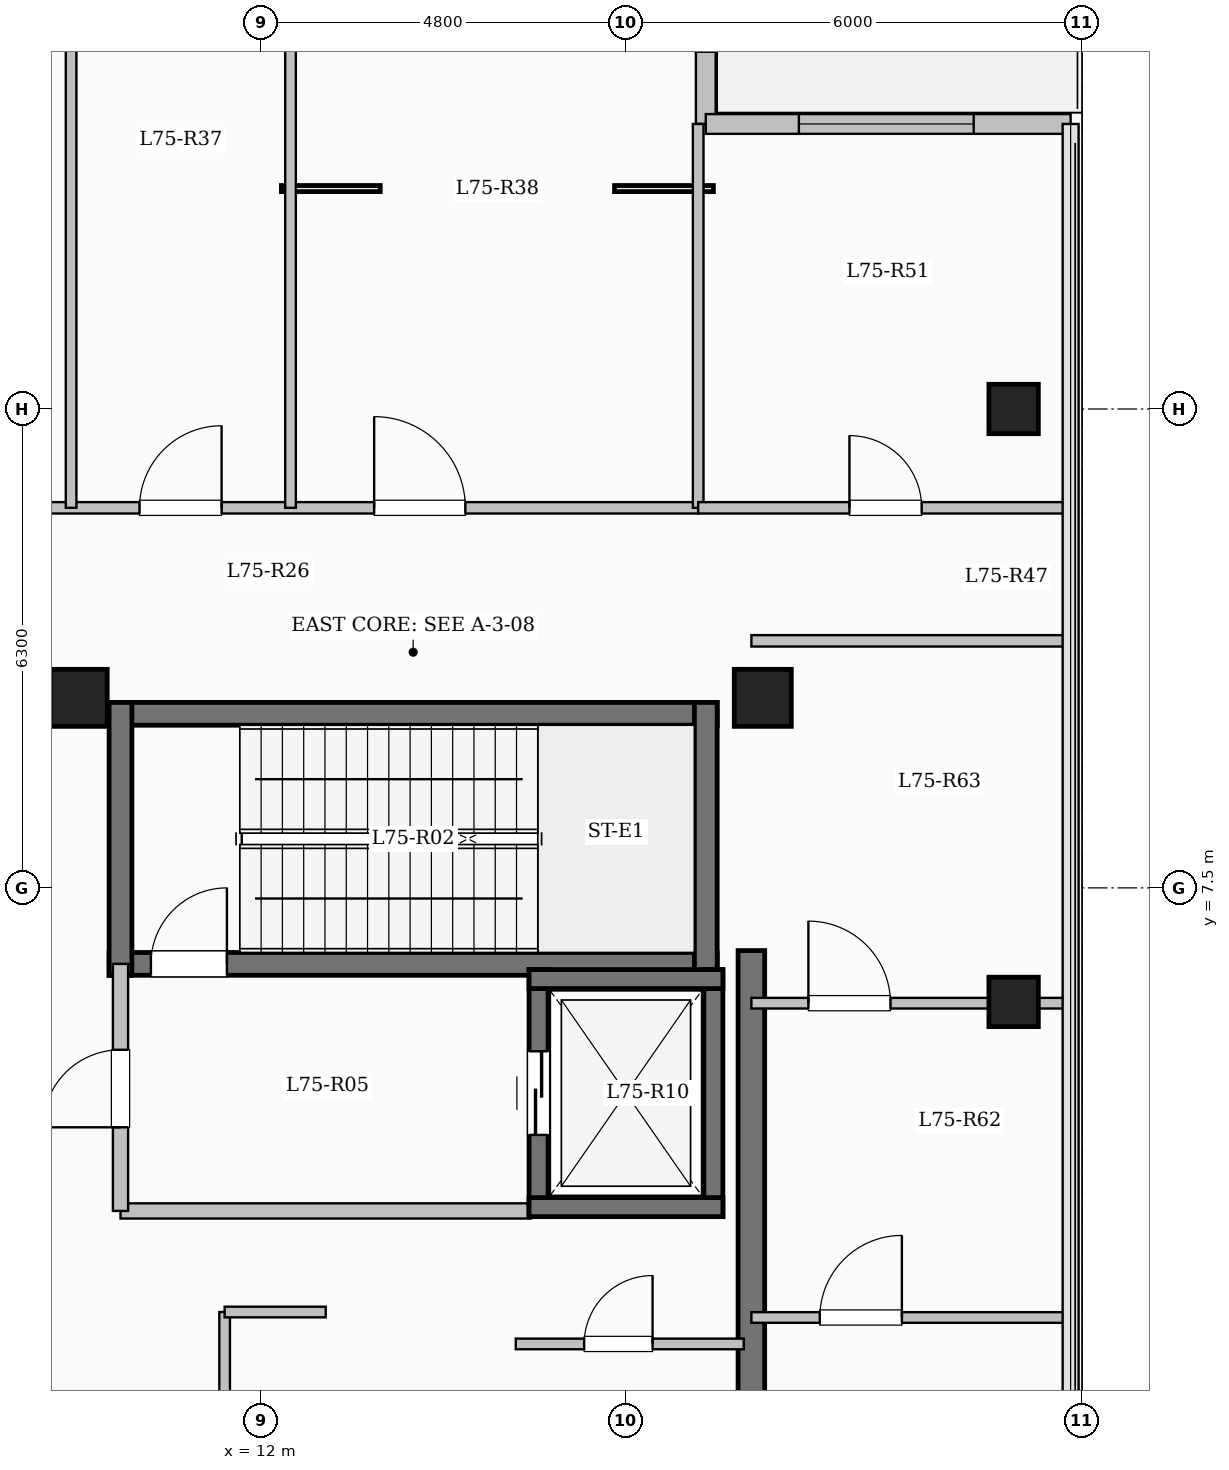
"""IFC4 building model, lengths in metres.
Left out: names, types, materials, properties, quantities, classifications, styles, units other than length and angle.
Written with IfcOpenShell. Run it as: python <this file> out.ifc"""

import sys

from ifc_helpers import new_model, si_unit, direction, frame, frame_2d, origin, origin_2d, place, context, subcontext, project, spatial, rectangle, extrude, element, fill, save


model = new_model("IFC4")
c1 = context("Model", 3, precision=1e-05, world=origin(), true_north=direction((0.0, 1.0)))
c2 = subcontext(c1, "Body", "Model", "MODEL_VIEW")
j1 = project(units=[si_unit("LENGTHUNIT", "METRE"), si_unit("PLANEANGLEUNIT", "RADIAN")], contexts=[c1])
p1 = place(None, origin())
s1 = spatial("IfcSite", under=j1, at=p1, CompositionType="ELEMENT")
p2 = place(p1, origin())
s2 = spatial("IfcBuilding", under=s1, at=p2, CompositionType="ELEMENT")
p3 = place(p2, frame((0.0, 0.0, 276.3)))
s3 = spatial("IfcBuildingStorey", under=s2, at=p3, CompositionType="ELEMENT", Elevation=276.3)
for number, where, z_axis, x_axis in (
    (1, (9.6, 10.0, 0.0), (0.0, 0.0, 1.0), (1.0, 0.0, 0.0)),
    (2, (18.6, 10.0, 0.0), (0.0, 0.0, 1.0), (1.0, 0.0, 0.0)),
):
    element("IfcColumn", number, at=place(p3, frame(where, z_axis=z_axis, x_axis=x_axis)), inside=s3, PredefinedType="COLUMN", context=c2, shape_type="SweptSolid", body=[
        extrude(rectangle(XDim=0.75, YDim=0.75, at=origin_2d()), origin(), (0.0, 0.0, 1.0), 5.25),
    ])
for number, where, z_axis, x_axis in (
    (3, (21.9, 6.0, 0.0), (0.0, 0.0, 1.0), (1.0, 0.0, 0.0)),
    (4, (21.9, 13.8, 0.0), (0.0, 0.0, 1.0), (1.0, 0.0, 0.0)),
):
    element("IfcColumn", number, at=place(p3, frame(where, z_axis=z_axis, x_axis=x_axis)), inside=s3, PredefinedType="COLUMN", context=c2, shape_type="SweptSolid", body=[
        extrude(rectangle(XDim=0.65, YDim=0.65, at=origin_2d()), origin(), (0.0, 0.0, 1.0), 5.25),
    ])
p4 = place(p3, frame((17.85, 20.85, 0.0), z_axis=(0.0, 0.0, 1.0), x_axis=(0.0, -1.0, 0.0)))
e5 = element("IfcWall", 5, at=p4, inside=s3, PredefinedType="SOLIDWALL", context=c2, shape_type="SweptSolid", body=[
    extrude(rectangle(XDim=3.3, YDim=0.26, at=frame_2d((1.65, 0.0))), origin(), (0.0, 0.0, 1.0), 4.95),
])
p5 = place(p4, frame((1.25, 0.0, 0.0)))
e6 = element("IfcOpeningElement", 6, at=p5, cuts=e5, PredefinedType="OPENING", context=c2, shape_type="SweptSolid", body=[
    extrude(rectangle(XDim=1.1, YDim=2.2, at=frame_2d((0.55, 1.1))), frame((0.0, 0.14, 0.0), z_axis=(0.0, -1.0, 0.0), x_axis=(1.0, 0.0, 0.0)), (0.0, 0.0, 1.0), 0.28),
])
p6 = place(p4, frame((0.365, 0.0, 0.95)))
e7 = element("IfcOpeningElement", 7, at=p6, cuts=e5, PredefinedType="OPENING", context=c2, shape_type="SweptSolid", body=[
    extrude(rectangle(XDim=0.7, YDim=1.5, at=frame_2d((0.35, 0.75))), frame((0.0, 0.14, 0.0), z_axis=(0.0, -1.0, 0.0), x_axis=(1.0, 0.0, 0.0)), (0.0, 0.0, 1.0), 0.28),
])
p7 = place(p3, frame((17.85, 17.55, 0.0), z_axis=(0.0, 0.0, 1.0), x_axis=(1.0, 0.0, 0.0)))
e8 = element("IfcWall", 8, at=p7, inside=s3, PredefinedType="SOLIDWALL", context=c2, shape_type="SweptSolid", body=[
    extrude(rectangle(XDim=4.8, YDim=0.26, at=frame_2d((2.4, 0.0))), origin(), (0.0, 0.0, 1.0), 4.95),
])
p8 = place(p7, frame((1.225, 0.0, 0.85)))
e9 = element("IfcOpeningElement", 9, at=p8, cuts=e8, PredefinedType="OPENING", context=c2, shape_type="SweptSolid", body=[
    extrude(rectangle(XDim=2.3, YDim=2.2, at=frame_2d((1.15, 1.1))), frame((0.0, 0.14, 0.0), z_axis=(0.0, -1.0, 0.0), x_axis=(1.0, 0.0, 0.0)), (0.0, 0.0, 1.0), 0.28),
])
p9 = place(p3, frame((10.0, 9.79, 0.0), z_axis=(0.0, 0.0, 1.0), x_axis=(1.0, 0.0, 0.0)))
e10 = element("IfcWall", 10, at=p9, inside=s3, PredefinedType="SHEAR", context=c2, shape_type="SweptSolid", body=[
    extrude(rectangle(XDim=8.0, YDim=0.3, at=frame_2d((4.0, 0.0))), origin(), (0.0, 0.0, 1.0), 5.25),
])
p10 = place(p3, frame((10.0, 6.5, 0.0), z_axis=(0.0, 0.0, 1.0), x_axis=(1.0, 0.0, 0.0)))
e11 = element("IfcWall", 11, at=p10, inside=s3, PredefinedType="SHEAR", context=c2, shape_type="SweptSolid", body=[
    extrude(rectangle(XDim=8.0, YDim=0.3, at=frame_2d((4.0, 0.0))), origin(), (0.0, 0.0, 1.0), 5.25),
])
p11 = place(p10, frame((0.55, 0.0, 0.0)))
e12 = element("IfcOpeningElement", 12, at=p11, cuts=e11, PredefinedType="OPENING", context=c2, shape_type="SweptSolid", body=[
    extrude(rectangle(XDim=1.0, YDim=2.15, at=frame_2d((0.5, 1.075))), frame((0.0, 0.16, 0.0), z_axis=(0.0, -1.0, 0.0), x_axis=(1.0, 0.0, 0.0)), (0.0, 0.0, 1.0), 0.32),
])
for number, where, z_axis, x_axis in (
    (13, (10.15, 6.35, 0.0), (0.0, 0.0, 1.0), (0.0, 1.0, 0.0)),
    (14, (17.85, 6.35, 0.0), (0.0, 0.0, 1.0), (0.0, 1.0, 0.0)),
):
    element("IfcWall", number, at=place(p3, frame(where, z_axis=z_axis, x_axis=x_axis)), inside=s3, PredefinedType="SHEAR", context=c2, shape_type="SweptSolid", body=[
        extrude(rectangle(XDim=3.59, YDim=0.3, at=frame_2d((1.795, 0.0))), origin(), (0.0, 0.0, 1.0), 5.25),
    ])
p12 = place(p3, frame((10.15, 3.25, 0.0), z_axis=(0.0, 0.0, 1.0), x_axis=(1.0, 0.0, 0.0)))
e15 = element("IfcWall", 15, at=p12, inside=s3, PredefinedType="SOLIDWALL", context=c2, shape_type="SweptSolid", body=[
    extrude(rectangle(XDim=5.4, YDim=0.2, at=frame_2d((2.7, 0.0))), origin(), (0.0, 0.0, 1.0), 4.95),
])
p13 = place(p3, frame((10.15, 3.25, 0.0), z_axis=(0.0, 0.0, 1.0), x_axis=(0.0, 1.0, 0.0)))
e16 = element("IfcWall", 16, at=p13, inside=s3, PredefinedType="SOLIDWALL", context=c2, shape_type="SweptSolid", body=[
    extrude(rectangle(XDim=3.25, YDim=0.2, at=frame_2d((1.625, 0.0))), origin(), (0.0, 0.0, 1.0), 4.95),
])
p14 = place(p13, frame((1.1, 0.0, 0.0)))
e17 = element("IfcOpeningElement", 17, at=p14, cuts=e16, PredefinedType="OPENING", context=c2, shape_type="SweptSolid", body=[
    extrude(rectangle(XDim=1.02, YDim=2.15, at=frame_2d((0.51, 1.075))), frame((0.0, 0.11, 0.0), z_axis=(0.0, -1.0, 0.0), x_axis=(1.0, 0.0, 0.0)), (0.0, 0.0, 1.0), 0.22),
])
p15 = place(p3, frame((15.65, 3.175, 0.0), z_axis=(0.0, 0.0, 1.0), x_axis=(0.0, 1.0, 0.0)))
e18 = element("IfcWall", 18, at=p15, inside=s3, PredefinedType="SHEAR", context=c2, shape_type="SweptSolid", body=[
    extrude(rectangle(XDim=3.25, YDim=0.25, at=frame_2d((1.625, 0.0))), origin(), (0.0, 0.0, 1.0), 5.25),
])
p16 = place(p15, frame((1.075, 0.0, 0.0)))
e19 = element("IfcOpeningElement", 19, at=p16, cuts=e18, PredefinedType="OPENING", context=c2, shape_type="SweptSolid", body=[
    extrude(rectangle(XDim=1.1, YDim=2.15, at=frame_2d((0.55, 1.075))), frame((0.0, 0.135, 0.0), z_axis=(0.0, -1.0, 0.0), x_axis=(1.0, 0.0, 0.0)), (0.0, 0.0, 1.0), 0.27),
])
p17 = place(p3, frame((17.95, 3.175, 0.0), z_axis=(0.0, 0.0, 1.0), x_axis=(0.0, 1.0, 0.0)))
e20 = element("IfcWall", 20, at=p17, inside=s3, PredefinedType="SHEAR", context=c2, shape_type="SweptSolid", body=[
    extrude(rectangle(XDim=3.25, YDim=0.25, at=frame_2d((1.625, 0.0))), origin(), (0.0, 0.0, 1.0), 5.25),
])
for number, where, z_axis, x_axis in (
    (21, (15.525, 3.3, 0.0), (0.0, 0.0, 1.0), (1.0, 0.0, 0.0)),
    (22, (15.525, 6.3, 0.0), (0.0, 0.0, 1.0), (1.0, 0.0, 0.0)),
):
    element("IfcWall", number, at=place(p3, frame(where, z_axis=z_axis, x_axis=x_axis)), inside=s3, PredefinedType="SHEAR", context=c2, shape_type="SweptSolid", body=[
        extrude(rectangle(XDim=2.55, YDim=0.25, at=frame_2d((1.275, 0.0))), origin(), (0.0, 0.0, 1.0), 5.25),
    ])
p18 = place(p3, frame((18.45, -7.375, 0.0), z_axis=(0.0, 0.0, 1.0), x_axis=(0.0, 1.0, 0.0)))
e23 = element("IfcWall", 23, at=p18, inside=s3, PredefinedType="SHEAR", context=c2, shape_type="SweptSolid", body=[
    extrude(rectangle(XDim=14.05, YDim=0.35, at=frame_2d((7.025, 0.0))), origin(), (0.0, 0.0, 1.0), 5.25),
])
p19 = place(p3, frame((15.35, 1.5, 0.0), z_axis=(0.0, 0.0, 1.0), x_axis=(1.0, 0.0, 0.0)))
e24 = element("IfcWall", 24, at=p19, inside=s3, PredefinedType="PARTITIONING", context=c2, shape_type="SweptSolid", body=[
    extrude(rectangle(XDim=3.0, YDim=0.14, at=frame_2d((1.5, 0.0))), origin(), (0.0, 0.0, 1.0), 4.95),
])
p20 = place(p19, frame((0.9, 0.0, 0.0)))
e25 = element("IfcOpeningElement", 25, at=p20, cuts=e24, PredefinedType="OPENING", context=c2, shape_type="SweptSolid", body=[
    extrude(rectangle(XDim=0.9, YDim=2.08, at=frame_2d((0.45, 1.04))), frame((0.0, 0.08, 0.0), z_axis=(0.0, -1.0, 0.0), x_axis=(1.0, 0.0, 0.0)), (0.0, 0.0, 1.0), 0.16),
])
p21 = place(p3, frame((11.52, -7.2, 0.0), z_axis=(0.0, 0.0, 1.0), x_axis=(0.0, 1.0, 0.0)))
e26 = element("IfcWall", 26, at=p21, inside=s3, PredefinedType="PARTITIONING", context=c2, shape_type="SweptSolid", body=[
    extrude(rectangle(XDim=9.12, YDim=0.14, at=frame_2d((4.56, 0.0))), origin(), (0.0, 0.0, 1.0), 4.95),
])
p22 = place(p21, frame((1.8, 0.0, 0.0)))
e27 = element("IfcOpeningElement", 27, at=p22, cuts=e26, PredefinedType="OPENING", context=c2, shape_type="SweptSolid", body=[
    extrude(rectangle(XDim=0.9, YDim=2.08, at=frame_2d((0.45, 1.04))), frame((0.0, 0.08, 0.0), z_axis=(0.0, -1.0, 0.0), x_axis=(1.0, 0.0, 0.0)), (0.0, 0.0, 1.0), 0.16),
])
p23 = place(p21, frame((6.2, 0.0, 0.0)))
e28 = element("IfcOpeningElement", 28, at=p23, cuts=e26, PredefinedType="OPENING", context=c2, shape_type="SweptSolid", body=[
    extrude(rectangle(XDim=0.9, YDim=2.08, at=frame_2d((0.45, 1.04))), frame((0.0, 0.08, 0.0), z_axis=(0.0, -1.0, 0.0), x_axis=(1.0, 0.0, 0.0)), (0.0, 0.0, 1.0), 0.16),
])
p24 = place(p3, frame((11.52, 1.92, 0.0), z_axis=(0.0, 0.0, 1.0), x_axis=(1.0, 0.0, 0.0)))
e29 = element("IfcWall", 29, at=p24, inside=s3, PredefinedType="PARTITIONING", context=c2, shape_type="SweptSolid", body=[
    extrude(rectangle(XDim=1.33, YDim=0.14, at=frame_2d((0.665, 0.0))), origin(), (0.0, 0.0, 1.0), 4.95),
])
p25 = place(p3, frame((3.85, 12.5, 0.0), z_axis=(0.0, 0.0, 1.0), x_axis=(1.0, 0.0, 0.0)))
e30 = element("IfcWall", 30, at=p25, inside=s3, PredefinedType="PARTITIONING", context=c2, shape_type="SweptSolid", body=[
    extrude(rectangle(XDim=13.9, YDim=0.15, at=frame_2d((6.95, 0.0))), origin(), (0.0, 0.0, 1.0), 4.95),
])
p26 = place(p25, frame((0.8, 0.0, 0.0)))
e31 = element("IfcOpeningElement", 31, at=p26, cuts=e30, PredefinedType="OPENING", context=c2, shape_type="SweptSolid", body=[
    extrude(rectangle(XDim=0.95, YDim=2.15, at=frame_2d((0.475, 1.075))), frame((0.0, 0.085, 0.0), z_axis=(0.0, -1.0, 0.0), x_axis=(1.0, 0.0, 0.0)), (0.0, 0.0, 1.0), 0.17),
])
p27 = place(p25, frame((3.6, 0.0, 0.0)))
e32 = element("IfcOpeningElement", 32, at=p27, cuts=e30, PredefinedType="OPENING", context=c2, shape_type="SweptSolid", body=[
    extrude(rectangle(XDim=0.95, YDim=2.15, at=frame_2d((0.475, 1.075))), frame((0.0, 0.085, 0.0), z_axis=(0.0, -1.0, 0.0), x_axis=(1.0, 0.0, 0.0)), (0.0, 0.0, 1.0), 0.17),
])
p28 = place(p25, frame((6.55, 0.0, 0.0)))
e33 = element("IfcOpeningElement", 33, at=p28, cuts=e30, PredefinedType="OPENING", context=c2, shape_type="SweptSolid", body=[
    extrude(rectangle(XDim=1.08, YDim=2.15, at=frame_2d((0.54, 1.075))), frame((0.0, 0.085, 0.0), z_axis=(0.0, -1.0, 0.0), x_axis=(1.0, 0.0, 0.0)), (0.0, 0.0, 1.0), 0.17),
])
p29 = place(p25, frame((9.637, 0.0, 0.0)))
e34 = element("IfcOpeningElement", 34, at=p29, cuts=e30, PredefinedType="OPENING", context=c2, shape_type="SweptSolid", body=[
    extrude(rectangle(XDim=1.2, YDim=2.15, at=frame_2d((0.6, 1.075))), frame((0.0, 0.085, 0.0), z_axis=(0.0, -1.0, 0.0), x_axis=(1.0, 0.0, 0.0)), (0.0, 0.0, 1.0), 0.17),
])
p30 = place(p3, frame((9.5, 12.5, 0.0), z_axis=(0.0, 0.0, 1.0), x_axis=(0.0, 1.0, 0.0)))
e35 = element("IfcWall", 35, at=p30, inside=s3, PredefinedType="PARTITIONING", context=c2, shape_type="SweptSolid", body=[
    extrude(rectangle(XDim=8.77, YDim=0.14, at=frame_2d((4.385, 0.0))), origin(), (0.0, 0.0, 1.0), 4.95),
])
p31 = place(p3, frame((12.387, 12.5, 0.0), z_axis=(0.0, 0.0, 1.0), x_axis=(0.0, 1.0, 0.0)))
e36 = element("IfcWall", 36, at=p31, inside=s3, PredefinedType="PARTITIONING", context=c2, shape_type="SweptSolid", body=[
    extrude(rectangle(XDim=8.4, YDim=0.14, at=frame_2d((4.2, 0.0))), origin(), (0.0, 0.0, 1.0), 4.95),
])
p32 = place(p3, frame((18.45, 10.75, 0.0), z_axis=(0.0, 0.0, 1.0), x_axis=(1.0, 0.0, 0.0)))
e37 = element("IfcWall", 37, at=p32, inside=s3, PredefinedType="PARTITIONING", context=c2, shape_type="SweptSolid", body=[
    extrude(rectangle(XDim=4.23, YDim=0.15, at=frame_2d((2.115, 0.0))), origin(), (0.0, 0.0, 1.0), 4.95),
])
p33 = place(p3, frame((17.75, 12.5, 0.0), z_axis=(0.0, 0.0, 1.0), x_axis=(0.0, 1.0, 0.0)))
e38 = element("IfcWall", 38, at=p33, inside=s3, PredefinedType="PARTITIONING", context=c2, shape_type="SweptSolid", body=[
    extrude(rectangle(XDim=5.05, YDim=0.14, at=frame_2d((2.525, 0.0))), origin(), (0.0, 0.0, 1.0), 4.95),
])
p34 = place(p3, frame((17.75, 12.5, 0.0), z_axis=(0.0, 0.0, 1.0), x_axis=(1.0, 0.0, 0.0)))
e39 = element("IfcWall", 39, at=p34, inside=s3, PredefinedType="PARTITIONING", context=c2, shape_type="SweptSolid", body=[
    extrude(rectangle(XDim=4.93, YDim=0.15, at=frame_2d((2.465, 0.0))), origin(), (0.0, 0.0, 1.0), 4.95),
])
p35 = place(p34, frame((1.99, 0.0, 0.0)))
e40 = element("IfcOpeningElement", 40, at=p35, cuts=e39, PredefinedType="OPENING", context=c2, shape_type="SweptSolid", body=[
    extrude(rectangle(XDim=0.95, YDim=2.15, at=frame_2d((0.475, 1.075))), frame((0.0, 0.085, 0.0), z_axis=(0.0, -1.0, 0.0), x_axis=(1.0, 0.0, 0.0)), (0.0, 0.0, 1.0), 0.17),
])
p36 = place(p3, frame((18.45, 1.848, 0.0), z_axis=(0.0, 0.0, 1.0), x_axis=(1.0, 0.0, 0.0)))
e41 = element("IfcWall", 41, at=p36, inside=s3, PredefinedType="PARTITIONING", context=c2, shape_type="SweptSolid", body=[
    extrude(rectangle(XDim=4.23, YDim=0.14, at=frame_2d((2.115, 0.0))), origin(), (0.0, 0.0, 1.0), 4.95),
])
p37 = place(p36, frame((0.9, 0.0, 0.0)))
e42 = element("IfcOpeningElement", 42, at=p37, cuts=e41, PredefinedType="OPENING", context=c2, shape_type="SweptSolid", body=[
    extrude(rectangle(XDim=1.08, YDim=2.15, at=frame_2d((0.54, 1.075))), frame((0.0, 0.08, 0.0), z_axis=(0.0, -1.0, 0.0), x_axis=(1.0, 0.0, 0.0)), (0.0, 0.0, 1.0), 0.16),
])
p38 = place(p3, frame((18.45, 5.983, 0.0), z_axis=(0.0, 0.0, 1.0), x_axis=(1.0, 0.0, 0.0)))
e43 = element("IfcWall", 43, at=p38, inside=s3, PredefinedType="PARTITIONING", context=c2, shape_type="SweptSolid", body=[
    extrude(rectangle(XDim=4.23, YDim=0.14, at=frame_2d((2.115, 0.0))), origin(), (0.0, 0.0, 1.0), 4.535),
])
p39 = place(p38, frame((0.75, 0.0, 0.0)))
e44 = element("IfcOpeningElement", 44, at=p39, cuts=e43, PredefinedType="OPENING", context=c2, shape_type="SweptSolid", body=[
    extrude(rectangle(XDim=1.08, YDim=2.15, at=frame_2d((0.54, 1.075))), frame((0.0, 0.08, 0.0), z_axis=(0.0, -1.0, 0.0), x_axis=(1.0, 0.0, 0.0)), (0.0, 0.0, 1.0), 0.16),
])
p40 = place(p8, origin())
e45 = element("IfcWindow", 45, at=p40, inside=s3, PartitioningType="SINGLE_PANEL", PredefinedType="WINDOW", context=c2, shape_type="SweptSolid", body=[
    extrude(rectangle(XDim=2.3, YDim=2.2, at=frame_2d((1.15, 1.1))), frame((0.0, 0.03, 0.0), z_axis=(0.0, -1.0, 0.0), x_axis=(1.0, 0.0, 0.0)), (0.0, 0.0, 1.0), 0.06),
])
fill(e9, e45)
p41 = place(p11, origin())
e46 = element("IfcDoor", 46, at=p41, inside=s3, OperationType="SINGLE_SWING_RIGHT", PredefinedType="DOOR", context=c2, shape_type="SweptSolid", body=[
    extrude(rectangle(XDim=1.0, YDim=2.15, at=frame_2d((0.5, 1.075))), frame((0.0, 0.025, 0.0), z_axis=(0.0, -1.0, 0.0), x_axis=(1.0, 0.0, 0.0)), (0.0, 0.0, 1.0), 0.05),
])
fill(e12, e46)
p42 = place(p14, origin())
e47 = element("IfcDoor", 47, at=p42, inside=s3, OperationType="SINGLE_SWING_LEFT", PredefinedType="DOOR", context=c2, shape_type="SweptSolid", body=[
    extrude(rectangle(XDim=1.02, YDim=2.15, at=frame_2d((0.51, 1.075))), frame((0.0, 0.025, 0.0), z_axis=(0.0, -1.0, 0.0), x_axis=(1.0, 0.0, 0.0)), (0.0, 0.0, 1.0), 0.05),
])
fill(e17, e47)
p43 = place(p16, origin())
e48 = element("IfcDoor", 48, at=p43, inside=s3, OperationType="SLIDING_TO_LEFT", PredefinedType="DOOR", context=c2, shape_type="SweptSolid", body=[
    extrude(rectangle(XDim=1.1, YDim=2.15, at=frame_2d((0.55, 1.075))), frame((0.0, 0.025, 0.0), z_axis=(0.0, -1.0, 0.0), x_axis=(1.0, 0.0, 0.0)), (0.0, 0.0, 1.0), 0.05),
])
fill(e19, e48)
p44 = place(p20, origin())
e49 = element("IfcDoor", 49, at=p44, inside=s3, OperationType="SINGLE_SWING_RIGHT", PredefinedType="DOOR", context=c2, shape_type="SweptSolid", body=[
    extrude(rectangle(XDim=0.9, YDim=2.08, at=frame_2d((0.45, 1.04))), frame((0.0, 0.025, 0.0), z_axis=(0.0, -1.0, 0.0), x_axis=(1.0, 0.0, 0.0)), (0.0, 0.0, 1.0), 0.05),
])
fill(e25, e49)
p45 = place(p28, origin())
e50 = element("IfcDoor", 50, at=p45, inside=s3, OperationType="SINGLE_SWING_RIGHT", PredefinedType="DOOR", context=c2, shape_type="SweptSolid", body=[
    extrude(rectangle(XDim=1.08, YDim=2.15, at=frame_2d((0.54, 1.075))), frame((0.0, 0.025, 0.0), z_axis=(0.0, -1.0, 0.0), x_axis=(1.0, 0.0, 0.0)), (0.0, 0.0, 1.0), 0.05),
])
fill(e33, e50)
p46 = place(p29, origin())
e51 = element("IfcDoor", 51, at=p46, inside=s3, OperationType="SINGLE_SWING_LEFT", PredefinedType="DOOR", context=c2, shape_type="SweptSolid", body=[
    extrude(rectangle(XDim=1.2, YDim=2.15, at=frame_2d((0.6, 1.075))), frame((0.0, 0.025, 0.0), z_axis=(0.0, -1.0, 0.0), x_axis=(1.0, 0.0, 0.0)), (0.0, 0.0, 1.0), 0.05),
])
fill(e34, e51)
p47 = place(p35, origin())
e52 = element("IfcDoor", 52, at=p47, inside=s3, OperationType="SINGLE_SWING_LEFT", PredefinedType="DOOR", context=c2, shape_type="SweptSolid", body=[
    extrude(rectangle(XDim=0.95, YDim=2.15, at=frame_2d((0.475, 1.075))), frame((0.0, 0.025, 0.0), z_axis=(0.0, -1.0, 0.0), x_axis=(1.0, 0.0, 0.0)), (0.0, 0.0, 1.0), 0.05),
])
fill(e40, e52)
p48 = place(p37, origin())
e53 = element("IfcDoor", 53, at=p48, inside=s3, OperationType="SINGLE_SWING_RIGHT", PredefinedType="DOOR", context=c2, shape_type="SweptSolid", body=[
    extrude(rectangle(XDim=1.08, YDim=2.15, at=frame_2d((0.54, 1.075))), frame((0.0, 0.025, 0.0), z_axis=(0.0, -1.0, 0.0), x_axis=(1.0, 0.0, 0.0)), (0.0, 0.0, 1.0), 0.05),
])
fill(e42, e53)
p49 = place(p39, origin())
e54 = element("IfcDoor", 54, at=p49, inside=s3, OperationType="SINGLE_SWING_LEFT", PredefinedType="DOOR", context=c2, shape_type="SweptSolid", body=[
    extrude(rectangle(XDim=1.08, YDim=2.15, at=frame_2d((0.54, 1.075))), frame((0.0, 0.025, 0.0), z_axis=(0.0, -1.0, 0.0), x_axis=(1.0, 0.0, 0.0)), (0.0, 0.0, 1.0), 0.05),
])
fill(e44, e54)
save(model, sys.argv[1])
